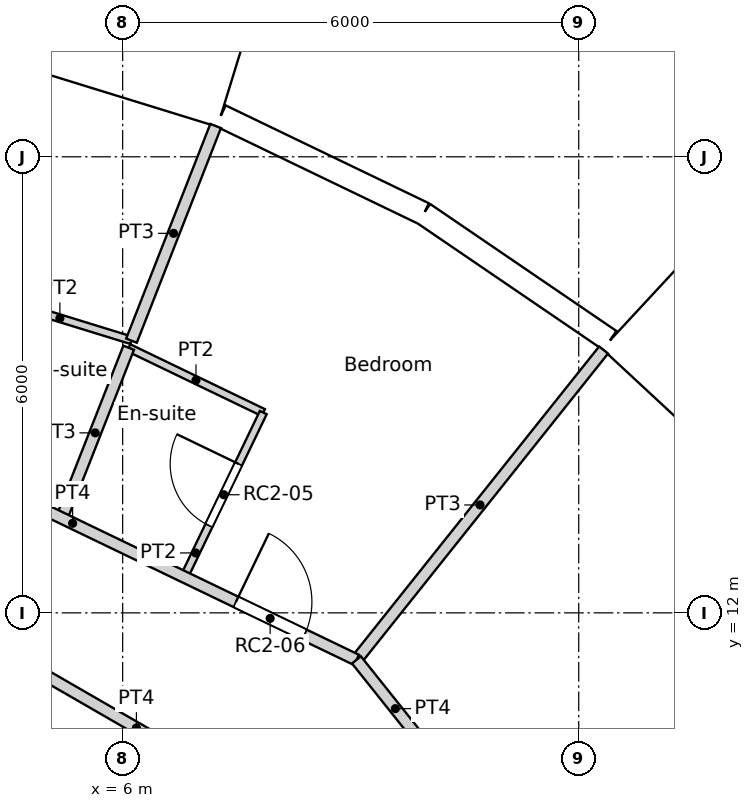
"""IFC4 building model, lengths in metres.
Left out: names, types, materials, properties, quantities, classifications, styles, units other than length and angle.
Written with IfcOpenShell. Run it as: python <this file> out.ifc"""

import sys

from ifc_helpers import new_model, si_unit, direction, frame, frame_2d, origin, origin_2d, place, context, subcontext, project, spatial, rectangle, circle, extrude, element, fill, save


model = new_model("IFC4")
c1 = context("Model", 3, precision=1e-05, world=origin(), true_north=direction((0.0, 1.0)))
c2 = subcontext(c1, "Body", "Model", "MODEL_VIEW")
j1 = project(units=[si_unit("LENGTHUNIT", "METRE"), si_unit("PLANEANGLEUNIT", "RADIAN")], contexts=[c1])
p1 = place(None, origin())
s1 = spatial("IfcSite", under=j1, at=p1, CompositionType="ELEMENT")
p2 = place(p1, origin())
s2 = spatial("IfcBuilding", under=s1, at=p2, CompositionType="ELEMENT")
p3 = place(p2, frame((0.0, 0.0, 241.8)))
s3 = spatial("IfcBuildingStorey", under=s2, at=p3, CompositionType="ELEMENT", Elevation=241.8)
for number, where, z_axis, x_axis in (
    (1, (11.735, 14.716, 0.0), (0.0, 0.0, 1.0), (1.0, 0.0, 0.0)),
    (2, (6.876, 17.521, 0.0), (0.0, 0.0, 1.0), (1.0, 0.0, 0.0)),
):
    element("IfcColumn", number, at=place(p3, frame(where, z_axis=z_axis, x_axis=x_axis)), inside=s3, PredefinedType="COLUMN", context=c2, shape_type="SweptSolid", body=[
        extrude(circle(Radius=0.55, at=origin_2d()), origin(), (0.0, 0.0, 1.0), 3.6),
    ])
p4 = place(p3, frame((15.003, 13.964, -0.35), z_axis=(0.0, 0.0, 1.0), x_axis=(-0.733022439167, 0.680204457261, 0.0)))
e3 = element("IfcWall", 3, at=p4, inside=s3, PredefinedType="ELEMENTEDWALL", context=c2, shape_type="SweptSolid", body=[
    extrude(rectangle(XDim=3.0, YDim=1.45, at=frame_2d((1.5, 0.0))), origin(), (0.0, 0.0, 1.0), 3.6),
])
p5 = place(p4, frame((1.5, 0.0, 1.9)))
e4 = element("IfcOpeningElement", 4, at=p5, cuts=e3, PredefinedType="OPENING", context=c2, shape_type="SweptSolid", body=[
    extrude(circle(Radius=0.9, at=origin_2d()), frame((0.0, 0.735, 0.0), z_axis=(0.0, -1.0, 0.0), x_axis=(1.0, 0.0, 0.0)), (0.0, 0.0, 1.0), 1.47),
])
p6 = place(p3, frame((12.408, 15.584, 0.0), z_axis=(0.0, 0.0, 1.0), x_axis=(-0.826236061068, 0.563324037646, 0.0)))
e5 = element("IfcWall", 5, at=p6, inside=s3, PredefinedType="SOLIDWALL", context=c2, shape_type="SweptSolid", body=[
    extrude(rectangle(XDim=2.962, YDim=0.3, at=frame_2d((1.481, 0.0))), origin(), (0.0, 0.0, 1.0), 3.25),
])
p7 = place(p6, frame((1.481, 0.0, 1.55)))
e6 = element("IfcOpeningElement", 6, at=p7, cuts=e5, PredefinedType="OPENING", context=c2, shape_type="SweptSolid", body=[
    extrude(circle(Radius=0.9, at=origin_2d()), frame((0.0, 0.16, 0.0), z_axis=(0.0, -1.0, 0.0), x_axis=(1.0, 0.0, 0.0)), (0.0, 0.0, 1.0), 0.32),
])
p8 = place(p3, frame((9.961, 17.253, 0.0), z_axis=(0.0, 0.0, 1.0), x_axis=(-0.90095513435, 0.433912255978, 0.0)))
e7 = element("IfcWall", 7, at=p8, inside=s3, PredefinedType="SOLIDWALL", context=c2, shape_type="SweptSolid", body=[
    extrude(rectangle(XDim=2.962, YDim=0.3, at=frame_2d((1.481, 0.0))), origin(), (0.0, 0.0, 1.0), 3.25),
])
p9 = place(p8, frame((1.481, 0.0, 1.55)))
e8 = element("IfcOpeningElement", 8, at=p9, cuts=e7, PredefinedType="OPENING", context=c2, shape_type="SweptSolid", body=[
    extrude(circle(Radius=0.9, at=origin_2d()), frame((0.0, 0.16, 0.0), z_axis=(0.0, -1.0, 0.0), x_axis=(1.0, 0.0, 0.0)), (0.0, 0.0, 1.0), 0.32),
])
p10 = place(p3, frame((7.458, 19.091, -0.35), z_axis=(0.0, 0.0, 1.0), x_axis=(-0.955571139978, 0.294760574774, 0.0)))
e9 = element("IfcWall", 9, at=p10, inside=s3, PredefinedType="ELEMENTEDWALL", context=c2, shape_type="SweptSolid", body=[
    extrude(rectangle(XDim=3.0, YDim=1.45, at=frame_2d((1.5, 0.0))), origin(), (0.0, 0.0, 1.0), 3.6),
])
p11 = place(p10, frame((1.5, 0.0, 1.9)))
e10 = element("IfcOpeningElement", 10, at=p11, cuts=e9, PredefinedType="OPENING", context=c2, shape_type="SweptSolid", body=[
    extrude(circle(Radius=0.9, at=origin_2d()), frame((0.0, 0.735, 0.0), z_axis=(0.0, -1.0, 0.0), x_axis=(1.0, 0.0, 0.0)), (0.0, 0.0, 1.0), 1.47),
])
p12 = place(p3, frame((3.261, 12.171, 0.0), z_axis=(0.0, 0.0, 1.0), x_axis=(0.866066809554, -0.499928276245, 0.0)))
e11 = element("IfcWall", 11, at=p12, inside=s3, PredefinedType="PARTITIONING", context=c2, shape_type="SweptSolid", body=[
    extrude(rectangle(XDim=6.743, YDim=0.15, at=frame_2d((3.371, 0.0))), origin(), (0.0, 0.0, 1.0), 3.25),
])
p13 = place(p3, frame((9.076, 11.381, 0.0), z_axis=(0.0, 0.0, 1.0), x_axis=(0.623805208652, -0.781579849829, 0.0)))
e12 = element("IfcWall", 12, at=p13, inside=s3, PredefinedType="PARTITIONING", context=c2, shape_type="SweptSolid", body=[
    extrude(rectangle(XDim=1.64, YDim=0.15, at=frame_2d((0.82, 0.0))), origin(), (0.0, 0.0, 1.0), 3.25),
])
p14 = place(p3, frame((3.238, 14.191, 0.0), z_axis=(0.0, 0.0, 1.0), x_axis=(0.901070942113, -0.433671716024, 0.0)))
e13 = element("IfcWall", 13, at=p14, inside=s3, PredefinedType="PARTITIONING", context=c2, shape_type="SweptSolid", body=[
    extrude(rectangle(XDim=6.479, YDim=0.15, at=frame_2d((3.239, 0.0))), origin(), (0.0, 0.0, 1.0), 3.25),
])
p15 = place(p14, frame((4.718, 0.0, 0.0)))
e14 = element("IfcOpeningElement", 14, at=p15, cuts=e13, PredefinedType="OPENING", context=c2, shape_type="SweptSolid", body=[
    extrude(rectangle(XDim=1.0, YDim=2.1, at=frame_2d((0.5, 1.05))), frame((0.0, 0.075, 0.0), z_axis=(0.0, -1.0, 0.0), x_axis=(1.0, 0.0, 0.0)), (0.0, 0.0, 1.0), 0.15),
])
p16 = place(p3, frame((9.076, 11.381, 0.0), z_axis=(0.0, 0.0, 1.0), x_axis=(0.623460949534, 0.781854490558, 0.0)))
e15 = element("IfcWall", 15, at=p16, inside=s3, PredefinedType="PARTITIONING", context=c2, shape_type="SweptSolid", body=[
    extrude(rectangle(XDim=5.214, YDim=0.15, at=frame_2d((2.607, 0.0))), origin(), (0.0, 0.0, 1.0), 3.25),
])
p17 = place(p3, frame((6.809, 12.473, 0.0), z_axis=(0.0, 0.0, 1.0), x_axis=(0.433815618773, 0.901001669759, 0.0)))
e16 = element("IfcWall", 16, at=p17, inside=s3, PredefinedType="PARTITIONING", context=c2, shape_type="SweptSolid", body=[
    extrude(rectangle(XDim=2.4, YDim=0.1, at=frame_2d((1.2, 0.0))), origin(), (0.0, 0.0, 1.0), 3.25),
])
p18 = place(p17, frame((0.75, 0.0, 0.0)))
e17 = element("IfcOpeningElement", 17, at=p18, cuts=e16, PredefinedType="OPENING", context=c2, shape_type="SweptSolid", body=[
    extrude(rectangle(XDim=0.9, YDim=2.04, at=frame_2d((0.45, 1.02))), frame((0.0, 0.05, 0.0), z_axis=(0.0, -1.0, 0.0), x_axis=(1.0, 0.0, 0.0)), (0.0, 0.0, 1.0), 0.1),
])
p19 = place(p3, frame((6.079, 15.488, 0.0), z_axis=(0.0, 0.0, 1.0), x_axis=(0.900936932599, -0.433950047216, 0.0)))
e18 = element("IfcWall", 18, at=p19, inside=s3, PredefinedType="PARTITIONING", context=c2, shape_type="SweptSolid", body=[
    extrude(rectangle(XDim=1.966, YDim=0.1, at=frame_2d((0.983, 0.0))), origin(), (0.0, 0.0, 1.0), 3.25),
])
p20 = place(p3, frame((6.116, 15.581, 0.0), z_axis=(0.0, 0.0, 1.0), x_axis=(0.364942529397, 0.931030047978, 0.0)))
e19 = element("IfcWall", 19, at=p20, inside=s3, PredefinedType="PARTITIONING", context=c2, shape_type="SweptSolid", body=[
    extrude(rectangle(XDim=3.033, YDim=0.15, at=frame_2d((1.517, 0.0))), origin(), (0.0, 0.0, 1.0), 3.25),
])
p21 = place(p3, frame((5.199, 13.248, 0.0), z_axis=(0.0, 0.0, 1.0), x_axis=(0.365699450144, 0.930732997247, 0.0)))
e20 = element("IfcWall", 20, at=p21, inside=s3, PredefinedType="PARTITIONING", context=c2, shape_type="SweptSolid", body=[
    extrude(rectangle(XDim=2.407, YDim=0.15, at=frame_2d((1.203, 0.0))), origin(), (0.0, 0.0, 1.0), 3.25),
])
p22 = place(p3, frame((4.231, 16.166, 0.0), z_axis=(0.0, 0.0, 1.0), x_axis=(0.955671951668, -0.294433559219, 0.0)))
e21 = element("IfcWall", 21, at=p22, inside=s3, PredefinedType="PARTITIONING", context=c2, shape_type="SweptSolid", body=[
    extrude(rectangle(XDim=1.973, YDim=0.1, at=frame_2d((0.987, 0.0))), origin(), (0.0, 0.0, 1.0), 3.25),
])
p23 = place(p5, origin())
e22 = element("IfcWindow", 22, at=p23, inside=s3, PartitioningType="SINGLE_PANEL", PredefinedType="WINDOW", context=c2, shape_type="SweptSolid", body=[
    extrude(circle(Radius=0.9, at=origin_2d()), frame((0.0, 0.695, 0.0), z_axis=(0.0, -1.0, 0.0), x_axis=(1.0, 0.0, 0.0)), (0.0, 0.0, 1.0), 0.1),
])
fill(e4, e22)
p24 = place(p7, origin())
e23 = element("IfcWindow", 23, at=p24, inside=s3, PartitioningType="SINGLE_PANEL", PredefinedType="WINDOW", context=c2, shape_type="SweptSolid", body=[
    extrude(circle(Radius=0.9, at=origin_2d()), frame((0.0, 0.12, 0.0), z_axis=(0.0, -1.0, 0.0), x_axis=(1.0, 0.0, 0.0)), (0.0, 0.0, 1.0), 0.1),
])
fill(e6, e23)
p25 = place(p9, origin())
e24 = element("IfcWindow", 24, at=p25, inside=s3, PartitioningType="SINGLE_PANEL", PredefinedType="WINDOW", context=c2, shape_type="SweptSolid", body=[
    extrude(circle(Radius=0.9, at=origin_2d()), frame((0.0, 0.12, 0.0), z_axis=(0.0, -1.0, 0.0), x_axis=(1.0, 0.0, 0.0)), (0.0, 0.0, 1.0), 0.1),
])
fill(e8, e24)
p26 = place(p11, origin())
e25 = element("IfcWindow", 25, at=p26, inside=s3, PartitioningType="SINGLE_PANEL", PredefinedType="WINDOW", context=c2, shape_type="SweptSolid", body=[
    extrude(circle(Radius=0.9, at=origin_2d()), frame((0.0, 0.695, 0.0), z_axis=(0.0, -1.0, 0.0), x_axis=(1.0, 0.0, 0.0)), (0.0, 0.0, 1.0), 0.1),
])
fill(e10, e25)
p27 = place(p18, origin())
e26 = element("IfcDoor", 26, at=p27, inside=s3, OperationType="SINGLE_SWING_RIGHT", PredefinedType="DOOR", context=c2, shape_type="SweptSolid", body=[
    extrude(rectangle(XDim=0.9, YDim=2.04, at=frame_2d((0.45, 1.02))), frame((0.0, 0.025, 0.0), z_axis=(0.0, -1.0, 0.0), x_axis=(1.0, 0.0, 0.0)), (0.0, 0.0, 1.0), 0.05),
])
fill(e17, e26)
p28 = place(p15, origin())
e27 = element("IfcDoor", 27, at=p28, inside=s3, OperationType="SINGLE_SWING_LEFT", PredefinedType="DOOR", context=c2, shape_type="SweptSolid", body=[
    extrude(rectangle(XDim=1.0, YDim=2.1, at=frame_2d((0.5, 1.05))), frame((0.0, 0.025, 0.0), z_axis=(0.0, -1.0, 0.0), x_axis=(1.0, 0.0, 0.0)), (0.0, 0.0, 1.0), 0.05),
])
fill(e14, e27)
save(model, sys.argv[1])
